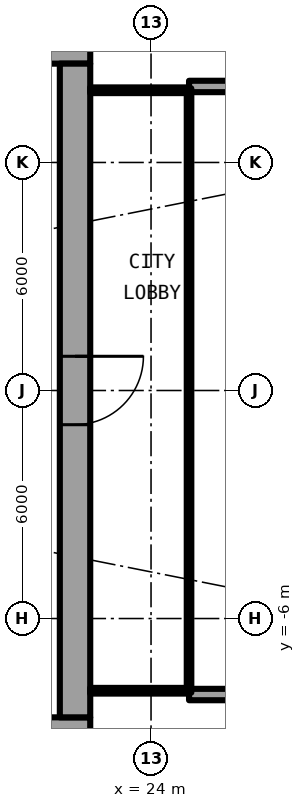
"""IFC4 building model, lengths in metres.
Left out: names, types, materials, properties, quantities, classifications, styles, units other than length and angle.
Written with IfcOpenShell. Run it as: python <this file> out.ifc"""

import sys

from ifc_helpers import new_model, si_unit, direction, frame, frame_2d, origin, place, context, subcontext, project, spatial, rectangle, extrude, element, fill, save


model = new_model("IFC4")
c1 = context("Model", 3, precision=1e-05, world=origin(), true_north=direction((0.0, 1.0)))
c2 = subcontext(c1, "Body", "Model", "MODEL_VIEW")
j1 = project(units=[si_unit("LENGTHUNIT", "METRE"), si_unit("PLANEANGLEUNIT", "RADIAN")], contexts=[c1])
p1 = place(None, origin())
s1 = spatial("IfcSite", under=j1, at=p1, CompositionType="ELEMENT")
p2 = place(p1, origin())
s2 = spatial("IfcBuilding", under=s1, at=p2, CompositionType="ELEMENT")
p3 = place(p2, frame((0.0, 0.0, 35.0)))
s3 = spatial("IfcBuildingStorey", under=s2, at=p3, CompositionType="ELEMENT", Elevation=35.0)
for number, where, z_axis, x_axis in (
    (1, (25.0, 8.0, 0.0), (0.0, 0.0, 1.0), (1.0, 0.0, 0.0)),
    (2, (25.0, -8.0, 0.0), (0.0, 0.0, 1.0), (1.0, 0.0, 0.0)),
):
    element("IfcWall", number, at=place(p3, frame(where, z_axis=z_axis, x_axis=x_axis)), inside=s3, PredefinedType="SOLIDWALL", context=c2, shape_type="SweptSolid", body=[
        extrude(rectangle(XDim=2.667, YDim=0.3, at=frame_2d((1.333, 0.0))), origin(), (0.0, 0.0, 1.0), 2.7),
    ])
p4 = place(p3, frame((22.4, 9.0, 0.0), z_axis=(0.0, 0.0, 1.0), x_axis=(-1.0, 0.0, 0.0)))
e3 = element("IfcWall", 3, at=p4, inside=s3, PredefinedType="SHEAR", context=c2, shape_type="SweptSolid", body=[
    extrude(rectangle(XDim=14.2, YDim=0.8, at=frame_2d((7.1, 0.0))), origin(), (0.0, 0.0, 1.0), 3.05),
])
p5 = place(p4, frame((1.325, 0.0, 0.0)))
e4 = element("IfcOpeningElement", 4, at=p5, cuts=e3, PredefinedType="OPENING", context=c2, shape_type="SweptSolid", body=[
    extrude(rectangle(XDim=1.2, YDim=2.3, at=frame_2d((0.6, 1.15))), frame((0.0, 0.41, 0.0), z_axis=(0.0, -1.0, 0.0), x_axis=(1.0, 0.0, 0.0)), (0.0, 0.0, 1.0), 0.82),
])
p6 = place(p3, frame((8.2, -9.0, 0.0), z_axis=(0.0, 0.0, 1.0), x_axis=(1.0, 0.0, 0.0)))
e5 = element("IfcWall", 5, at=p6, inside=s3, PredefinedType="SHEAR", context=c2, shape_type="SweptSolid", body=[
    extrude(rectangle(XDim=14.2, YDim=0.8, at=frame_2d((7.1, 0.0))), origin(), (0.0, 0.0, 1.0), 3.05),
])
p7 = place(p6, frame((11.675, 0.0, 0.0)))
e6 = element("IfcOpeningElement", 6, at=p7, cuts=e5, PredefinedType="OPENING", context=c2, shape_type="SweptSolid", body=[
    extrude(rectangle(XDim=1.2, YDim=2.3, at=frame_2d((0.6, 1.15))), frame((0.0, 0.41, 0.0), z_axis=(0.0, -1.0, 0.0), x_axis=(1.0, 0.0, 0.0)), (0.0, 0.0, 1.0), 0.82),
])
p8 = place(p3, frame((22.0, 8.6, 0.0), z_axis=(0.0, 0.0, 1.0), x_axis=(0.0, -1.0, 0.0)))
e7 = element("IfcWall", 7, at=p8, inside=s3, PredefinedType="SHEAR", context=c2, shape_type="SweptSolid", body=[
    extrude(rectangle(XDim=17.2, YDim=0.8, at=frame_2d((8.6, 0.0))), origin(), (0.0, 0.0, 1.0), 3.05),
])
p9 = place(p8, frame((7.7, 0.0, 0.0)))
e8 = element("IfcOpeningElement", 8, at=p9, cuts=e7, PredefinedType="OPENING", context=c2, shape_type="SweptSolid", body=[
    extrude(rectangle(XDim=1.8, YDim=2.3, at=frame_2d((0.9, 1.15))), frame((0.0, 0.41, 0.0), z_axis=(0.0, -1.0, 0.0), x_axis=(1.0, 0.0, 0.0)), (0.0, 0.0, 1.0), 0.82),
])
for number, where, z_axis, x_axis in (
    (9, (22.4, -7.9, 0.0), (0.0, 0.0, 1.0), (1.0, 0.0, 0.0)),
    (10, (22.4, 7.9, 0.0), (0.0, 0.0, 1.0), (1.0, 0.0, 0.0)),
):
    element("IfcWall", number, at=place(p3, frame(where, z_axis=z_axis, x_axis=x_axis)), inside=s3, PredefinedType="PARTITIONING", context=c2, shape_type="SweptSolid", body=[
        extrude(rectangle(XDim=2.54, YDim=0.15, at=frame_2d((1.27, 0.0))), origin(), (0.0, 0.0, 1.0), 2.7),
    ])
p10 = place(p3, frame((25.0, -7.95, 0.0), z_axis=(0.0, 0.0, 1.0), x_axis=(0.0, 1.0, 0.0)))
e11 = element("IfcWall", 11, at=p10, inside=s3, PredefinedType="PARTITIONING", context=c2, shape_type="SweptSolid", body=[
    extrude(rectangle(XDim=15.9, YDim=0.12, at=frame_2d((7.95, 0.0))), origin(), (0.0, 0.0, 1.0), 2.7),
])
p11 = place(p10, frame((0.95, 0.0, 0.1)))
e12 = element("IfcOpeningElement", 12, at=p11, cuts=e11, PredefinedType="OPENING", context=c2, shape_type="SweptSolid", body=[
    extrude(rectangle(XDim=14.0, YDim=2.35, at=frame_2d((7.0, 1.175))), frame((0.0, 0.07, 0.0), z_axis=(0.0, -1.0, 0.0), x_axis=(1.0, 0.0, 0.0)), (0.0, 0.0, 1.0), 0.14),
])
p12 = place(p9, origin())
e13 = element("IfcDoor", 13, at=p12, inside=s3, OperationType="SINGLE_SWING_LEFT", PredefinedType="DOOR", context=c2, shape_type="SweptSolid", body=[
    extrude(rectangle(XDim=1.8, YDim=2.3, at=frame_2d((0.9, 1.15))), frame((0.0, 0.025, 0.0), z_axis=(0.0, -1.0, 0.0), x_axis=(1.0, 0.0, 0.0)), (0.0, 0.0, 1.0), 0.05),
])
fill(e8, e13)
p13 = place(p11, origin())
e14 = element("IfcWindow", 14, at=p13, inside=s3, PartitioningType="SINGLE_PANEL", PredefinedType="WINDOW", context=c2, shape_type="SweptSolid", body=[
    extrude(rectangle(XDim=14.0, YDim=2.35, at=frame_2d((7.0, 1.175))), frame((0.0, 0.03, 0.0), z_axis=(0.0, -1.0, 0.0), x_axis=(1.0, 0.0, 0.0)), (0.0, 0.0, 1.0), 0.06),
])
fill(e12, e14)
save(model, sys.argv[1])
